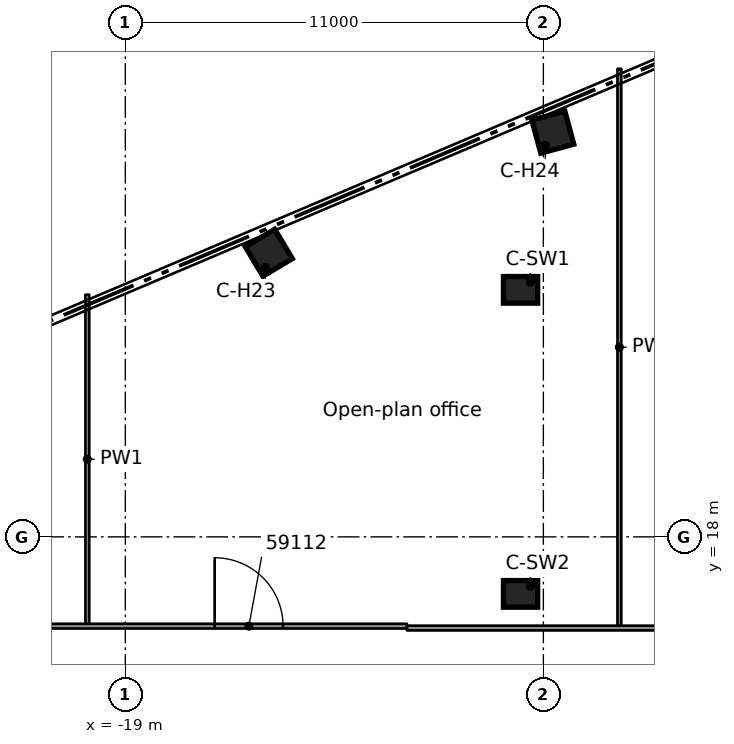
"""IFC4 building model, lengths in metres.
Left out: names, types, materials, properties, quantities, classifications, styles, units other than length and angle.
Written with IfcOpenShell. Run it as: python <this file> out.ifc"""

import sys

from ifc_helpers import new_model, si_unit, direction, frame, frame_2d, origin, origin_2d, place, context, subcontext, project, spatial, rectangle, extrude, element, fill, save


model = new_model("IFC4")
c1 = context("Model", 3, precision=1e-05, world=origin(), true_north=direction((0.0, 1.0)))
c2 = subcontext(c1, "Body", "Model", "MODEL_VIEW")
j1 = project(units=[si_unit("LENGTHUNIT", "METRE"), si_unit("PLANEANGLEUNIT", "RADIAN")], contexts=[c1])
p1 = place(None, origin())
s1 = spatial("IfcSite", under=j1, at=p1, CompositionType="ELEMENT")
p2 = place(p1, origin())
s2 = spatial("IfcBuilding", under=s1, at=p2, CompositionType="ELEMENT")
p3 = place(p2, frame((0.0, 0.0, 289.4)))
s3 = spatial("IfcBuildingStorey", under=s2, at=p3, CompositionType="ELEMENT", Elevation=289.4)
for number, where, z_axis, x_axis in (
    (1, (-15.224, 25.477, 0.0), (0.0, 0.0, 1.0), (-0.513, 0.858, 0.0)),
    (2, (-7.751, 28.649, 0.0), (0.0, 0.0, 1.0), (-0.261, 0.965, 0.0)),
):
    element("IfcColumn", number, at=place(p3, frame(where, z_axis=z_axis, x_axis=x_axis)), inside=s3, PredefinedType="COLUMN", context=c2, shape_type="SweptSolid", body=[
        extrude(rectangle(XDim=0.9, YDim=0.9, at=origin_2d()), origin(), (0.0, 0.0, 1.0), 3.5),
    ])
for number, where, z_axis, x_axis in (
    (3, (-8.6, 24.5, 0.0), (0.0, 0.0, 1.0), (1.0, 0.0, 0.0)),
    (4, (-8.6, 16.5, 0.0), (0.0, 0.0, 1.0), (1.0, 0.0, 0.0)),
):
    element("IfcColumn", number, at=place(p3, frame(where, z_axis=z_axis, x_axis=x_axis)), inside=s3, PredefinedType="COLUMN", context=c2, shape_type="SweptSolid", body=[
        extrude(rectangle(XDim=0.9, YDim=0.7, at=origin_2d()), origin(), (0.0, 0.0, 1.0), 3.5),
    ])
p4 = place(p3, frame((-11.59, 15.601, 0.0), z_axis=(0.0, 0.0, 1.0), x_axis=(1.0, 0.0, 0.0)))
e5 = element("IfcWall", 5, at=p4, inside=s3, PredefinedType="PARTITIONING", context=c2, shape_type="SweptSolid", body=[
    extrude(rectangle(XDim=23.127, YDim=0.125, at=frame_2d((11.563, 0.0))), origin(), (0.0, 0.0, 1.0), 3.15),
])
p5 = place(p4, frame((10.94, 0.0, 0.0)))
e6 = element("IfcOpeningElement", 6, at=p5, cuts=e5, PredefinedType="OPENING", context=c2, shape_type="SweptSolid", body=[
    extrude(rectangle(XDim=0.9, YDim=2.1, at=frame_2d((0.45, 1.05))), frame((0.0, 0.073, 0.0), z_axis=(0.0, -1.0, 0.0), x_axis=(1.0, 0.0, 0.0)), (0.0, 0.0, 1.0), 0.145),
])
p6 = place(p4, frame((19.789, 0.0, 0.0)))
e7 = element("IfcOpeningElement", 7, at=p6, cuts=e5, PredefinedType="OPENING", context=c2, shape_type="SweptSolid", body=[
    extrude(rectangle(XDim=0.9, YDim=2.1, at=frame_2d((0.45, 1.05))), frame((0.0, 0.073, 0.0), z_axis=(0.0, -1.0, 0.0), x_axis=(1.0, 0.0, 0.0)), (0.0, 0.0, 1.0), 0.145),
])
p7 = place(p3, frame((-22.587, 15.651, 0.0), z_axis=(0.0, 0.0, 1.0), x_axis=(1.0, 0.0, 0.0)))
e8 = element("IfcWall", 8, at=p7, inside=s3, PredefinedType="PARTITIONING", context=c2, shape_type="SweptSolid", body=[
    extrude(rectangle(XDim=10.996, YDim=0.125, at=frame_2d((5.498, 0.0))), origin(), (0.0, 0.0, 1.0), 3.15),
])
p8 = place(p7, frame((5.938, 0.0, 0.0)))
e9 = element("IfcOpeningElement", 9, at=p8, cuts=e8, PredefinedType="OPENING", context=c2, shape_type="SweptSolid", body=[
    extrude(rectangle(XDim=1.8, YDim=2.1, at=frame_2d((0.9, 1.05))), frame((0.0, 0.073, 0.0), z_axis=(0.0, -1.0, 0.0), x_axis=(1.0, 0.0, 0.0)), (0.0, 0.0, 1.0), 0.145),
])
p9 = place(p3, frame((-6.0, 15.664, 0.0), z_axis=(0.0, 0.0, 1.0), x_axis=(0.0, 1.0, 0.0)))
e10 = element("IfcWall", 10, at=p9, inside=s3, PredefinedType="PARTITIONING", context=c2, shape_type="SweptSolid", body=[
    extrude(rectangle(XDim=14.652, YDim=0.1, at=frame_2d((7.326, 0.0))), origin(), (0.0, 0.0, 1.0), 3.15),
])
p10 = place(p3, frame((-20.0, 15.713, 0.0), z_axis=(0.0, 0.0, 1.0), x_axis=(0.0, 1.0, 0.0)))
e11 = element("IfcWall", 11, at=p10, inside=s3, PredefinedType="PARTITIONING", context=c2, shape_type="SweptSolid", body=[
    extrude(rectangle(XDim=8.661, YDim=0.1, at=frame_2d((4.331, 0.0))), origin(), (0.0, 0.0, 1.0), 3.15),
])
p11 = place(p8, origin())
e12 = element("IfcDoor", 12, at=p11, inside=s3, OperationType="DOUBLE_DOOR_SINGLE_SWING", PredefinedType="DOOR", context=c2, shape_type="SweptSolid", body=[
    extrude(rectangle(XDim=1.8, YDim=2.1, at=frame_2d((0.9, 1.05))), frame((0.0, 0.025, 0.0), z_axis=(0.0, -1.0, 0.0), x_axis=(1.0, 0.0, 0.0)), (0.0, 0.0, 1.0), 0.05),
])
fill(e9, e12)
save(model, sys.argv[1])
